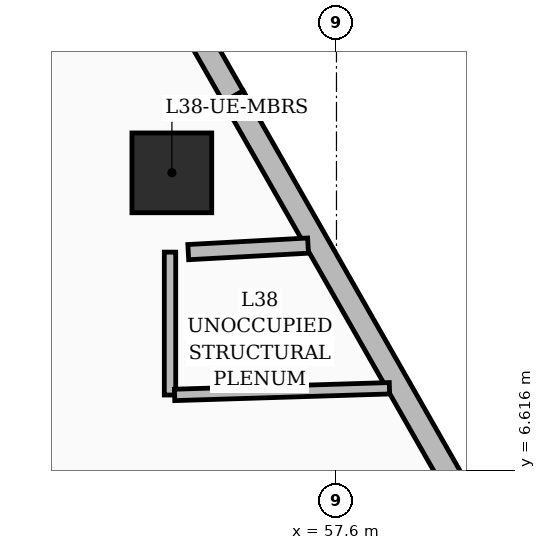
"""IFC4 building model, lengths in metres.
Left out: names, types, materials, properties, quantities, classifications, styles, units other than length and angle.
Written with IfcOpenShell. Run it as: python <this file> out.ifc"""

import sys

from ifc_helpers import new_model, si_unit, direction, frame, frame_2d, origin, origin_2d, place, context, subcontext, project, spatial, rectangle, extrude, element, save


model = new_model("IFC4")
c1 = context("Model", 3, precision=1e-05, world=origin(), true_north=direction((0.0, 1.0)))
c2 = subcontext(c1, "Body", "Model", "MODEL_VIEW")
j1 = project(units=[si_unit("LENGTHUNIT", "METRE"), si_unit("PLANEANGLEUNIT", "RADIAN")], contexts=[c1])
p1 = place(None, origin())
s1 = spatial("IfcSite", under=j1, at=p1, CompositionType="ELEMENT")
p2 = place(p1, origin())
s2 = spatial("IfcBuilding", under=s1, at=p2, CompositionType="ELEMENT")
p3 = place(p2, frame((0.0, 0.0, 150.0)))
s3 = spatial("IfcBuildingStorey", under=s2, at=p3, CompositionType="ELEMENT", Elevation=150.0)
p4 = place(p3, frame((55.434, 10.533, 0.0), z_axis=(0.0, 0.0, 1.0), x_axis=(1.0, 0.0, 0.0)))
e1 = element("IfcColumn", 1, at=p4, inside=s3, PredefinedType="COLUMN", context=c2, shape_type="SweptSolid", body=[
    extrude(rectangle(XDim=1.05, YDim=1.05, at=origin_2d()), origin(), (0.0, 0.0, 1.0), 3.6),
])
p5 = place(p3, frame((52.598, 17.923, 0.0), z_axis=(0.0, 0.0, 1.0), x_axis=(0.495698993586, -0.868494391322, 0.0)))
e2 = element("IfcWall", 2, at=p5, inside=s3, PredefinedType="SOLIDWALL", context=c2, shape_type="SweptSolid", body=[
    extrude(rectangle(XDim=7.352, YDim=0.3, at=frame_2d((3.676, 0.0))), origin(), (0.0, 0.0, 1.0), 3.35),
])
p6 = place(p5, frame((1.025, 0.0, 0.6)))
e3 = element("IfcOpeningElement", 3, at=p6, cuts=e2, PredefinedType="OPENING", context=c2, shape_type="SweptSolid", body=[
    extrude(rectangle(XDim=1.5, YDim=2.1, at=frame_2d((0.75, 1.05))), frame((0.0, 0.16, 0.0), z_axis=(0.0, -1.0, 0.0), x_axis=(1.0, 0.0, 0.0)), (0.0, 0.0, 1.0), 0.32),
])
p7 = place(p5, frame((4.4, 0.0, 0.6)))
e4 = element("IfcOpeningElement", 4, at=p7, cuts=e2, PredefinedType="OPENING", context=c2, shape_type="SweptSolid", body=[
    extrude(rectangle(XDim=1.5, YDim=2.1, at=frame_2d((0.75, 1.05))), frame((0.0, 0.16, 0.0), z_axis=(0.0, -1.0, 0.0), x_axis=(1.0, 0.0, 0.0)), (0.0, 0.0, 1.0), 0.32),
])
p8 = place(p3, frame((56.242, 11.538, 0.0), z_axis=(0.0, 0.0, 1.0), x_axis=(0.495684697404, -0.868502550808, 0.0)))
e5 = element("IfcWall", 5, at=p8, inside=s3, PredefinedType="SOLIDWALL", context=c2, shape_type="SweptSolid", body=[
    extrude(rectangle(XDim=7.352, YDim=0.3, at=frame_2d((3.676, 0.0))), origin(), (0.0, 0.0, 1.0), 3.35),
])
p9 = place(p3, frame((55.41, 7.61, 0.0), z_axis=(0.0, 0.0, 1.0), x_axis=(0.0, 1.0, 0.0)))
e6 = element("IfcWall", 6, at=p9, inside=s3, PredefinedType="PARTITIONING", context=c2, shape_type="SweptSolid", body=[
    extrude(rectangle(XDim=1.88, YDim=0.15, at=frame_2d((0.94, 0.0))), origin(), (0.0, 0.0, 1.0), 3.35),
])
p10 = place(p3, frame((58.297, 7.699, 0.0), z_axis=(0.0, 0.0, 1.0), x_axis=(-0.999522462189, -0.030900608071, 0.0)))
e7 = element("IfcWall", 7, at=p10, inside=s3, PredefinedType="PARTITIONING", context=c2, shape_type="SweptSolid", body=[
    extrude(rectangle(XDim=2.829, YDim=0.15, at=frame_2d((1.414, 0.0))), origin(), (0.0, 0.0, 1.0), 3.35),
])
p11 = place(p3, frame((57.226, 9.576, 0.0), z_axis=(0.0, 0.0, 1.0), x_axis=(-0.998516931133, -0.05444206316, 0.0)))
e8 = element("IfcWall", 8, at=p11, inside=s3, PredefinedType="PARTITIONING", context=c2, shape_type="SweptSolid", body=[
    extrude(rectangle(XDim=1.579, YDim=0.2, at=frame_2d((0.789, 0.0))), origin(), (0.0, 0.0, 1.0), 3.35),
])
save(model, sys.argv[1])
